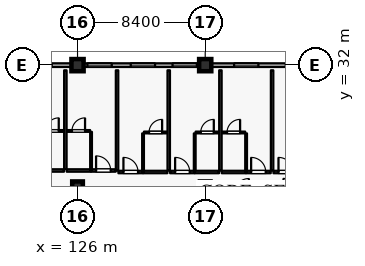
"""IFC4 building model, lengths in metres.
Left out: names, types, materials, properties, quantities, classifications, styles, units other than length and angle.
Written with IfcOpenShell. Run it as: python <this file> out.ifc"""

import sys

from ifc_helpers import new_model, si_unit, direction, frame, frame_2d, origin, origin_2d, place, context, subcontext, project, spatial, rectangle, extrude, element, fill, save


model = new_model("IFC4")
c1 = context("Model", 3, precision=1e-05, world=origin(), true_north=direction((0.0, 1.0)))
c2 = subcontext(c1, "Body", "Model", "MODEL_VIEW")
j1 = project(units=[si_unit("LENGTHUNIT", "METRE"), si_unit("PLANEANGLEUNIT", "RADIAN")], contexts=[c1])
p1 = place(None, origin())
s1 = spatial("IfcSite", under=j1, at=p1, CompositionType="ELEMENT")
p2 = place(p1, origin())
s2 = spatial("IfcBuilding", under=s1, at=p2, CompositionType="ELEMENT")
p3 = place(p2, frame((0.0, 0.0, 25.2)))
s3 = spatial("IfcBuildingStorey", under=s2, at=p3, CompositionType="ELEMENT", Elevation=25.2)
for number, where, z_axis, x_axis in (
    (1, (126.0, 32.0, 0.0), (0.0, 0.0, 1.0), (1.0, 0.0, 0.0)),
    (2, (134.4, 32.0, 0.0), (0.0, 0.0, 1.0), (1.0, 0.0, 0.0)),
):
    element("IfcColumn", number, at=place(p3, frame(where, z_axis=z_axis, x_axis=x_axis)), inside=s3, PredefinedType="COLUMN", context=c2, shape_type="SweptSolid", body=[
        extrude(rectangle(XDim=0.8, YDim=0.8, at=origin_2d()), origin(), (0.0, 0.0, 1.0), 3.6),
    ])
for number, where, z_axis, x_axis in (
    (3, (126.0, 24.0, 0.0), (0.0, 0.0, 1.0), (1.0, 0.0, 0.0)),
    (4, (134.4, 24.0, 0.0), (0.0, 0.0, 1.0), (1.0, 0.0, 0.0)),
):
    element("IfcColumn", number, at=place(p3, frame(where, z_axis=z_axis, x_axis=x_axis)), inside=s3, PredefinedType="COLUMN", context=c2, shape_type="SweptSolid", body=[
        extrude(rectangle(XDim=0.7, YDim=0.7, at=origin_2d()), origin(), (0.0, 0.0, 1.0), 3.6),
    ])
p4 = place(p3, frame((118.0, 32.0, 0.0), z_axis=(0.0, 0.0, 1.0), x_axis=(1.0, 0.0, 0.0)))
e5 = element("IfcWall", 5, at=p4, inside=s3, PredefinedType="SOLIDWALL", context=c2, shape_type="SweptSolid", body=[
    extrude(rectangle(XDim=7.6, YDim=0.24, at=frame_2d((3.8, 0.0))), origin(), (0.0, 0.0, 1.0), 2.93),
])
p5 = place(p4, frame((1.3, 0.0, 0.8)))
e6 = element("IfcOpeningElement", 6, at=p5, cuts=e5, PredefinedType="OPENING", context=c2, shape_type="SweptSolid", body=[
    extrude(rectangle(XDim=1.6, YDim=1.6, at=frame_2d((0.8, 0.8))), frame((0.0, 0.13, 0.0), z_axis=(0.0, -1.0, 0.0), x_axis=(1.0, 0.0, 0.0)), (0.0, 0.0, 1.0), 0.26),
])
p6 = place(p4, frame((4.7, 0.0, 0.8)))
e7 = element("IfcOpeningElement", 7, at=p6, cuts=e5, PredefinedType="OPENING", context=c2, shape_type="SweptSolid", body=[
    extrude(rectangle(XDim=1.6, YDim=1.6, at=frame_2d((0.8, 0.8))), frame((0.0, 0.13, 0.0), z_axis=(0.0, -1.0, 0.0), x_axis=(1.0, 0.0, 0.0)), (0.0, 0.0, 1.0), 0.26),
])
p7 = place(p3, frame((126.4, 32.0, 0.0), z_axis=(0.0, 0.0, 1.0), x_axis=(1.0, 0.0, 0.0)))
e8 = element("IfcWall", 8, at=p7, inside=s3, PredefinedType="SOLIDWALL", context=c2, shape_type="SweptSolid", body=[
    extrude(rectangle(XDim=7.6, YDim=0.24, at=frame_2d((3.8, 0.0))), origin(), (0.0, 0.0, 1.0), 2.93),
])
p8 = place(p7, frame((0.25, 0.0, 0.8)))
e9 = element("IfcOpeningElement", 9, at=p8, cuts=e8, PredefinedType="OPENING", context=c2, shape_type="SweptSolid", body=[
    extrude(rectangle(XDim=1.6, YDim=1.6, at=frame_2d((0.8, 0.8))), frame((0.0, 0.13, 0.0), z_axis=(0.0, -1.0, 0.0), x_axis=(1.0, 0.0, 0.0)), (0.0, 0.0, 1.0), 0.26),
])
p9 = place(p7, frame((3.1, 0.0, 0.8)))
e10 = element("IfcOpeningElement", 10, at=p9, cuts=e8, PredefinedType="OPENING", context=c2, shape_type="SweptSolid", body=[
    extrude(rectangle(XDim=1.6, YDim=1.6, at=frame_2d((0.8, 0.8))), frame((0.0, 0.13, 0.0), z_axis=(0.0, -1.0, 0.0), x_axis=(1.0, 0.0, 0.0)), (0.0, 0.0, 1.0), 0.26),
])
p10 = place(p7, frame((5.85, 0.0, 0.8)))
e11 = element("IfcOpeningElement", 11, at=p10, cuts=e8, PredefinedType="OPENING", context=c2, shape_type="SweptSolid", body=[
    extrude(rectangle(XDim=1.6, YDim=1.6, at=frame_2d((0.8, 0.8))), frame((0.0, 0.13, 0.0), z_axis=(0.0, -1.0, 0.0), x_axis=(1.0, 0.0, 0.0)), (0.0, 0.0, 1.0), 0.26),
])
p11 = place(p3, frame((134.8, 32.0, 0.0), z_axis=(0.0, 0.0, 1.0), x_axis=(1.0, 0.0, 0.0)))
e12 = element("IfcWall", 12, at=p11, inside=s3, PredefinedType="SOLIDWALL", context=c2, shape_type="SweptSolid", body=[
    extrude(rectangle(XDim=7.6, YDim=0.24, at=frame_2d((3.8, 0.0))), origin(), (0.0, 0.0, 1.0), 2.93),
])
p12 = place(p11, frame((1.5, 0.0, 0.8)))
e13 = element("IfcOpeningElement", 13, at=p12, cuts=e12, PredefinedType="OPENING", context=c2, shape_type="SweptSolid", body=[
    extrude(rectangle(XDim=1.6, YDim=1.6, at=frame_2d((0.8, 0.8))), frame((0.0, 0.13, 0.0), z_axis=(0.0, -1.0, 0.0), x_axis=(1.0, 0.0, 0.0)), (0.0, 0.0, 1.0), 0.26),
])
p13 = place(p11, frame((4.9, 0.0, 0.8)))
e14 = element("IfcOpeningElement", 14, at=p13, cuts=e12, PredefinedType="OPENING", context=c2, shape_type="SweptSolid", body=[
    extrude(rectangle(XDim=1.6, YDim=1.6, at=frame_2d((0.8, 0.8))), frame((0.0, 0.13, 0.0), z_axis=(0.0, -1.0, 0.0), x_axis=(1.0, 0.0, 0.0)), (0.0, 0.0, 1.0), 0.26),
])
p14 = place(p3, frame((123.52, 25.07, 0.0), z_axis=(0.0, 0.0, 1.0), x_axis=(1.0, 0.0, 0.0)))
e15 = element("IfcWall", 15, at=p14, inside=s3, PredefinedType="PARTITIONING", context=c2, shape_type="SweptSolid", body=[
    extrude(rectangle(XDim=1.59, YDim=0.16, at=frame_2d((0.795, 0.0))), origin(), (0.0, 0.0, 1.0), 3.335),
])
p15 = place(p3, frame((123.57, 27.67, 0.0), z_axis=(0.0, 0.0, 1.0), x_axis=(1.0, 0.0, 0.0)))
e16 = element("IfcWall", 16, at=p15, inside=s3, PredefinedType="PARTITIONING", context=c2, shape_type="SweptSolid", body=[
    extrude(rectangle(XDim=1.53, YDim=0.115, at=frame_2d((0.765, 0.0))), origin(), (0.0, 0.0, 1.0), 3.335),
])
p16 = place(p15, frame((0.335, 0.0, 0.0)))
e17 = element("IfcOpeningElement", 17, at=p16, cuts=e16, PredefinedType="OPENING", context=c2, shape_type="SweptSolid", body=[
    extrude(rectangle(XDim=0.86, YDim=2.12, at=frame_2d((0.43, 1.06))), frame((0.0, 0.067, 0.0), z_axis=(0.0, -1.0, 0.0), x_axis=(1.0, 0.0, 0.0)), (0.0, 0.0, 1.0), 0.135),
])
p17 = place(p3, frame((125.29, 25.07, 0.0), z_axis=(0.0, 0.0, 1.0), x_axis=(1.0, 0.0, 0.0)))
e18 = element("IfcWall", 18, at=p17, inside=s3, PredefinedType="PARTITIONING", context=c2, shape_type="SweptSolid", body=[
    extrude(rectangle(XDim=1.59, YDim=0.16, at=frame_2d((0.795, 0.0))), origin(), (0.0, 0.0, 1.0), 3.335),
])
p18 = place(p3, frame((126.89, 25.07, 0.0), z_axis=(0.0, 0.0, 1.0), x_axis=(1.0, 0.0, 0.0)))
e19 = element("IfcWall", 19, at=p18, inside=s3, PredefinedType="PARTITIONING", context=c2, shape_type="SweptSolid", body=[
    extrude(rectangle(XDim=1.62, YDim=0.16, at=frame_2d((0.81, 0.0))), origin(), (0.0, 0.0, 1.0), 3.335),
])
p19 = place(p18, frame((0.33, 0.0, 0.0)))
e20 = element("IfcOpeningElement", 20, at=p19, cuts=e19, PredefinedType="OPENING", context=c2, shape_type="SweptSolid", body=[
    extrude(rectangle(XDim=0.96, YDim=2.2, at=frame_2d((0.48, 1.1))), frame((0.0, 0.09, 0.0), z_axis=(0.0, -1.0, 0.0), x_axis=(1.0, 0.0, 0.0)), (0.0, 0.0, 1.0), 0.18),
])
p20 = place(p3, frame((126.89, 25.16, 0.0), z_axis=(0.0, 0.0, 1.0), x_axis=(0.0, 1.0, 0.0)))
e21 = element("IfcWall", 21, at=p20, inside=s3, PredefinedType="PARTITIONING", context=c2, shape_type="SweptSolid", body=[
    extrude(rectangle(XDim=2.45, YDim=0.115, at=frame_2d((1.225, 0.0))), origin(), (0.0, 0.0, 1.0), 3.335),
])
p21 = place(p3, frame((125.3, 27.67, 0.0), z_axis=(0.0, 0.0, 1.0), x_axis=(1.0, 0.0, 0.0)))
e22 = element("IfcWall", 22, at=p21, inside=s3, PredefinedType="PARTITIONING", context=c2, shape_type="SweptSolid", body=[
    extrude(rectangle(XDim=1.53, YDim=0.115, at=frame_2d((0.765, 0.0))), origin(), (0.0, 0.0, 1.0), 3.335),
])
p22 = place(p21, frame((0.335, 0.0, 0.0)))
e23 = element("IfcOpeningElement", 23, at=p22, cuts=e22, PredefinedType="OPENING", context=c2, shape_type="SweptSolid", body=[
    extrude(rectangle(XDim=0.86, YDim=2.12, at=frame_2d((0.43, 1.06))), frame((0.0, 0.067, 0.0), z_axis=(0.0, -1.0, 0.0), x_axis=(1.0, 0.0, 0.0)), (0.0, 0.0, 1.0), 0.135),
])
p23 = place(p3, frame((125.2, 25.16, 0.0), z_axis=(0.0, 0.0, 1.0), x_axis=(0.0, 1.0, 0.0)))
e24 = element("IfcWall", 24, at=p23, inside=s3, PredefinedType="PARTITIONING", context=c2, shape_type="SweptSolid", body=[
    extrude(rectangle(XDim=6.5, YDim=0.16, at=frame_2d((3.25, 0.0))), origin(), (0.0, 0.0, 1.0), 3.335),
])
p24 = place(p3, frame((128.69, 24.97, 0.0), z_axis=(0.0, 0.0, 1.0), x_axis=(1.0, 0.0, 0.0)))
e25 = element("IfcWall", 25, at=p24, inside=s3, PredefinedType="PARTITIONING", context=c2, shape_type="SweptSolid", body=[
    extrude(rectangle(XDim=1.62, YDim=0.16, at=frame_2d((0.81, 0.0))), origin(), (0.0, 0.0, 1.0), 3.335),
])
p25 = place(p24, frame((0.33, 0.0, 0.0)))
e26 = element("IfcOpeningElement", 26, at=p25, cuts=e25, PredefinedType="OPENING", context=c2, shape_type="SweptSolid", body=[
    extrude(rectangle(XDim=0.96, YDim=2.2, at=frame_2d((0.48, 1.1))), frame((0.0, 0.09, 0.0), z_axis=(0.0, -1.0, 0.0), x_axis=(1.0, 0.0, 0.0)), (0.0, 0.0, 1.0), 0.18),
])
p26 = place(p3, frame((130.32, 24.97, 0.0), z_axis=(0.0, 0.0, 1.0), x_axis=(1.0, 0.0, 0.0)))
e27 = element("IfcWall", 27, at=p26, inside=s3, PredefinedType="PARTITIONING", context=c2, shape_type="SweptSolid", body=[
    extrude(rectangle(XDim=1.59, YDim=0.16, at=frame_2d((0.795, 0.0))), origin(), (0.0, 0.0, 1.0), 3.335),
])
p27 = place(p3, frame((130.31, 25.06, 0.0), z_axis=(0.0, 0.0, 1.0), x_axis=(0.0, 1.0, 0.0)))
e28 = element("IfcWall", 28, at=p27, inside=s3, PredefinedType="PARTITIONING", context=c2, shape_type="SweptSolid", body=[
    extrude(rectangle(XDim=2.45, YDim=0.115, at=frame_2d((1.225, 0.0))), origin(), (0.0, 0.0, 1.0), 3.335),
])
p28 = place(p3, frame((130.37, 27.57, 0.0), z_axis=(0.0, 0.0, 1.0), x_axis=(1.0, 0.0, 0.0)))
e29 = element("IfcWall", 29, at=p28, inside=s3, PredefinedType="PARTITIONING", context=c2, shape_type="SweptSolid", body=[
    extrude(rectangle(XDim=1.53, YDim=0.115, at=frame_2d((0.765, 0.0))), origin(), (0.0, 0.0, 1.0), 3.335),
])
p29 = place(p28, frame((0.335, 0.0, 0.0)))
e30 = element("IfcOpeningElement", 30, at=p29, cuts=e29, PredefinedType="OPENING", context=c2, shape_type="SweptSolid", body=[
    extrude(rectangle(XDim=0.86, YDim=2.12, at=frame_2d((0.43, 1.06))), frame((0.0, 0.067, 0.0), z_axis=(0.0, -1.0, 0.0), x_axis=(1.0, 0.0, 0.0)), (0.0, 0.0, 1.0), 0.135),
])
p30 = place(p3, frame((128.6, 25.06, 0.0), z_axis=(0.0, 0.0, 1.0), x_axis=(0.0, 1.0, 0.0)))
e31 = element("IfcWall", 31, at=p30, inside=s3, PredefinedType="PARTITIONING", context=c2, shape_type="SweptSolid", body=[
    extrude(rectangle(XDim=6.6, YDim=0.16, at=frame_2d((3.3, 0.0))), origin(), (0.0, 0.0, 1.0), 3.335),
])
p31 = place(p3, frame((132.09, 24.97, 0.0), z_axis=(0.0, 0.0, 1.0), x_axis=(1.0, 0.0, 0.0)))
e32 = element("IfcWall", 32, at=p31, inside=s3, PredefinedType="PARTITIONING", context=c2, shape_type="SweptSolid", body=[
    extrude(rectangle(XDim=1.62, YDim=0.16, at=frame_2d((0.81, 0.0))), origin(), (0.0, 0.0, 1.0), 3.335),
])
p32 = place(p31, frame((0.33, 0.0, 0.0)))
e33 = element("IfcOpeningElement", 33, at=p32, cuts=e32, PredefinedType="OPENING", context=c2, shape_type="SweptSolid", body=[
    extrude(rectangle(XDim=0.96, YDim=2.2, at=frame_2d((0.48, 1.1))), frame((0.0, 0.09, 0.0), z_axis=(0.0, -1.0, 0.0), x_axis=(1.0, 0.0, 0.0)), (0.0, 0.0, 1.0), 0.18),
])
p33 = place(p3, frame((133.72, 24.97, 0.0), z_axis=(0.0, 0.0, 1.0), x_axis=(1.0, 0.0, 0.0)))
e34 = element("IfcWall", 34, at=p33, inside=s3, PredefinedType="PARTITIONING", context=c2, shape_type="SweptSolid", body=[
    extrude(rectangle(XDim=1.59, YDim=0.16, at=frame_2d((0.795, 0.0))), origin(), (0.0, 0.0, 1.0), 3.335),
])
p34 = place(p3, frame((133.71, 25.06, 0.0), z_axis=(0.0, 0.0, 1.0), x_axis=(0.0, 1.0, 0.0)))
e35 = element("IfcWall", 35, at=p34, inside=s3, PredefinedType="PARTITIONING", context=c2, shape_type="SweptSolid", body=[
    extrude(rectangle(XDim=2.45, YDim=0.115, at=frame_2d((1.225, 0.0))), origin(), (0.0, 0.0, 1.0), 3.335),
])
p35 = place(p3, frame((133.77, 27.57, 0.0), z_axis=(0.0, 0.0, 1.0), x_axis=(1.0, 0.0, 0.0)))
e36 = element("IfcWall", 36, at=p35, inside=s3, PredefinedType="PARTITIONING", context=c2, shape_type="SweptSolid", body=[
    extrude(rectangle(XDim=1.53, YDim=0.115, at=frame_2d((0.765, 0.0))), origin(), (0.0, 0.0, 1.0), 3.335),
])
p36 = place(p35, frame((0.335, 0.0, 0.0)))
e37 = element("IfcOpeningElement", 37, at=p36, cuts=e36, PredefinedType="OPENING", context=c2, shape_type="SweptSolid", body=[
    extrude(rectangle(XDim=0.86, YDim=2.12, at=frame_2d((0.43, 1.06))), frame((0.0, 0.067, 0.0), z_axis=(0.0, -1.0, 0.0), x_axis=(1.0, 0.0, 0.0)), (0.0, 0.0, 1.0), 0.135),
])
p37 = place(p3, frame((132.0, 25.06, 0.0), z_axis=(0.0, 0.0, 1.0), x_axis=(0.0, 1.0, 0.0)))
e38 = element("IfcWall", 38, at=p37, inside=s3, PredefinedType="PARTITIONING", context=c2, shape_type="SweptSolid", body=[
    extrude(rectangle(XDim=6.6, YDim=0.16, at=frame_2d((3.3, 0.0))), origin(), (0.0, 0.0, 1.0), 3.335),
])
p38 = place(p3, frame((135.49, 24.97, 0.0), z_axis=(0.0, 0.0, 1.0), x_axis=(1.0, 0.0, 0.0)))
e39 = element("IfcWall", 39, at=p38, inside=s3, PredefinedType="PARTITIONING", context=c2, shape_type="SweptSolid", body=[
    extrude(rectangle(XDim=1.59, YDim=0.16, at=frame_2d((0.795, 0.0))), origin(), (0.0, 0.0, 1.0), 3.335),
])
p39 = place(p3, frame((137.09, 24.97, 0.0), z_axis=(0.0, 0.0, 1.0), x_axis=(1.0, 0.0, 0.0)))
e40 = element("IfcWall", 40, at=p39, inside=s3, PredefinedType="PARTITIONING", context=c2, shape_type="SweptSolid", body=[
    extrude(rectangle(XDim=1.62, YDim=0.16, at=frame_2d((0.81, 0.0))), origin(), (0.0, 0.0, 1.0), 3.335),
])
p40 = place(p39, frame((0.33, 0.0, 0.0)))
e41 = element("IfcOpeningElement", 41, at=p40, cuts=e40, PredefinedType="OPENING", context=c2, shape_type="SweptSolid", body=[
    extrude(rectangle(XDim=0.96, YDim=2.2, at=frame_2d((0.48, 1.1))), frame((0.0, 0.09, 0.0), z_axis=(0.0, -1.0, 0.0), x_axis=(1.0, 0.0, 0.0)), (0.0, 0.0, 1.0), 0.18),
])
p41 = place(p3, frame((137.09, 25.06, 0.0), z_axis=(0.0, 0.0, 1.0), x_axis=(0.0, 1.0, 0.0)))
e42 = element("IfcWall", 42, at=p41, inside=s3, PredefinedType="PARTITIONING", context=c2, shape_type="SweptSolid", body=[
    extrude(rectangle(XDim=2.45, YDim=0.115, at=frame_2d((1.225, 0.0))), origin(), (0.0, 0.0, 1.0), 3.335),
])
p42 = place(p3, frame((135.5, 27.57, 0.0), z_axis=(0.0, 0.0, 1.0), x_axis=(1.0, 0.0, 0.0)))
e43 = element("IfcWall", 43, at=p42, inside=s3, PredefinedType="PARTITIONING", context=c2, shape_type="SweptSolid", body=[
    extrude(rectangle(XDim=1.53, YDim=0.115, at=frame_2d((0.765, 0.0))), origin(), (0.0, 0.0, 1.0), 3.335),
])
p43 = place(p42, frame((0.335, 0.0, 0.0)))
e44 = element("IfcOpeningElement", 44, at=p43, cuts=e43, PredefinedType="OPENING", context=c2, shape_type="SweptSolid", body=[
    extrude(rectangle(XDim=0.86, YDim=2.12, at=frame_2d((0.43, 1.06))), frame((0.0, 0.067, 0.0), z_axis=(0.0, -1.0, 0.0), x_axis=(1.0, 0.0, 0.0)), (0.0, 0.0, 1.0), 0.135),
])
p44 = place(p3, frame((135.4, 25.06, 0.0), z_axis=(0.0, 0.0, 1.0), x_axis=(0.0, 1.0, 0.0)))
e45 = element("IfcWall", 45, at=p44, inside=s3, PredefinedType="PARTITIONING", context=c2, shape_type="SweptSolid", body=[
    extrude(rectangle(XDim=6.6, YDim=0.16, at=frame_2d((3.3, 0.0))), origin(), (0.0, 0.0, 1.0), 3.335),
])
p45 = place(p3, frame((138.89, 24.97, 0.0), z_axis=(0.0, 0.0, 1.0), x_axis=(1.0, 0.0, 0.0)))
e46 = element("IfcWall", 46, at=p45, inside=s3, PredefinedType="PARTITIONING", context=c2, shape_type="SweptSolid", body=[
    extrude(rectangle(XDim=1.62, YDim=0.16, at=frame_2d((0.81, 0.0))), origin(), (0.0, 0.0, 1.0), 3.335),
])
p46 = place(p45, frame((0.33, 0.0, 0.0)))
e47 = element("IfcOpeningElement", 47, at=p46, cuts=e46, PredefinedType="OPENING", context=c2, shape_type="SweptSolid", body=[
    extrude(rectangle(XDim=0.96, YDim=2.2, at=frame_2d((0.48, 1.1))), frame((0.0, 0.09, 0.0), z_axis=(0.0, -1.0, 0.0), x_axis=(1.0, 0.0, 0.0)), (0.0, 0.0, 1.0), 0.18),
])
p47 = place(p3, frame((138.8, 25.06, 0.0), z_axis=(0.0, 0.0, 1.0), x_axis=(0.0, 1.0, 0.0)))
e48 = element("IfcWall", 48, at=p47, inside=s3, PredefinedType="PARTITIONING", context=c2, shape_type="SweptSolid", body=[
    extrude(rectangle(XDim=6.6, YDim=0.16, at=frame_2d((3.3, 0.0))), origin(), (0.0, 0.0, 1.0), 3.335),
])
p48 = place(p8, origin())
e49 = element("IfcWindow", 49, at=p48, inside=s3, PartitioningType="SINGLE_PANEL", PredefinedType="WINDOW", context=c2, shape_type="SweptSolid", body=[
    extrude(rectangle(XDim=1.6, YDim=1.6, at=frame_2d((0.8, 0.8))), frame((0.0, 0.03, 0.0), z_axis=(0.0, -1.0, 0.0), x_axis=(1.0, 0.0, 0.0)), (0.0, 0.0, 1.0), 0.06),
])
fill(e9, e49)
p49 = place(p9, origin())
e50 = element("IfcWindow", 50, at=p49, inside=s3, PartitioningType="SINGLE_PANEL", PredefinedType="WINDOW", context=c2, shape_type="SweptSolid", body=[
    extrude(rectangle(XDim=1.6, YDim=1.6, at=frame_2d((0.8, 0.8))), frame((0.0, 0.03, 0.0), z_axis=(0.0, -1.0, 0.0), x_axis=(1.0, 0.0, 0.0)), (0.0, 0.0, 1.0), 0.06),
])
fill(e10, e50)
p50 = place(p10, origin())
e51 = element("IfcWindow", 51, at=p50, inside=s3, PartitioningType="SINGLE_PANEL", PredefinedType="WINDOW", context=c2, shape_type="SweptSolid", body=[
    extrude(rectangle(XDim=1.6, YDim=1.6, at=frame_2d((0.8, 0.8))), frame((0.0, 0.03, 0.0), z_axis=(0.0, -1.0, 0.0), x_axis=(1.0, 0.0, 0.0)), (0.0, 0.0, 1.0), 0.06),
])
fill(e11, e51)
p51 = place(p12, origin())
e52 = element("IfcWindow", 52, at=p51, inside=s3, PartitioningType="SINGLE_PANEL", PredefinedType="WINDOW", context=c2, shape_type="SweptSolid", body=[
    extrude(rectangle(XDim=1.6, YDim=1.6, at=frame_2d((0.8, 0.8))), frame((0.0, 0.03, 0.0), z_axis=(0.0, -1.0, 0.0), x_axis=(1.0, 0.0, 0.0)), (0.0, 0.0, 1.0), 0.06),
])
fill(e13, e52)
p52 = place(p16, origin())
e53 = element("IfcDoor", 53, at=p52, inside=s3, OperationType="SINGLE_SWING_RIGHT", PredefinedType="DOOR", context=c2, shape_type="SweptSolid", body=[
    extrude(rectangle(XDim=0.86, YDim=2.12, at=frame_2d((0.43, 1.06))), frame((0.0, 0.025, 0.0), z_axis=(0.0, -1.0, 0.0), x_axis=(1.0, 0.0, 0.0)), (0.0, 0.0, 1.0), 0.05),
])
fill(e17, e53)
p53 = place(p19, origin())
e54 = element("IfcDoor", 54, at=p53, inside=s3, OperationType="SINGLE_SWING_LEFT", PredefinedType="DOOR", context=c2, shape_type="SweptSolid", body=[
    extrude(rectangle(XDim=0.96, YDim=2.2, at=frame_2d((0.48, 1.1))), frame((0.0, 0.025, 0.0), z_axis=(0.0, -1.0, 0.0), x_axis=(1.0, 0.0, 0.0)), (0.0, 0.0, 1.0), 0.05),
])
fill(e20, e54)
p54 = place(p22, origin())
e55 = element("IfcDoor", 55, at=p54, inside=s3, OperationType="SINGLE_SWING_RIGHT", PredefinedType="DOOR", context=c2, shape_type="SweptSolid", body=[
    extrude(rectangle(XDim=0.86, YDim=2.12, at=frame_2d((0.43, 1.06))), frame((0.0, 0.025, 0.0), z_axis=(0.0, -1.0, 0.0), x_axis=(1.0, 0.0, 0.0)), (0.0, 0.0, 1.0), 0.05),
])
fill(e23, e55)
p55 = place(p25, origin())
e56 = element("IfcDoor", 56, at=p55, inside=s3, OperationType="SINGLE_SWING_LEFT", PredefinedType="DOOR", context=c2, shape_type="SweptSolid", body=[
    extrude(rectangle(XDim=0.96, YDim=2.2, at=frame_2d((0.48, 1.1))), frame((0.0, 0.025, 0.0), z_axis=(0.0, -1.0, 0.0), x_axis=(1.0, 0.0, 0.0)), (0.0, 0.0, 1.0), 0.05),
])
fill(e26, e56)
p56 = place(p29, origin())
e57 = element("IfcDoor", 57, at=p56, inside=s3, OperationType="SINGLE_SWING_RIGHT", PredefinedType="DOOR", context=c2, shape_type="SweptSolid", body=[
    extrude(rectangle(XDim=0.86, YDim=2.12, at=frame_2d((0.43, 1.06))), frame((0.0, 0.025, 0.0), z_axis=(0.0, -1.0, 0.0), x_axis=(1.0, 0.0, 0.0)), (0.0, 0.0, 1.0), 0.05),
])
fill(e30, e57)
p57 = place(p32, origin())
e58 = element("IfcDoor", 58, at=p57, inside=s3, OperationType="SINGLE_SWING_LEFT", PredefinedType="DOOR", context=c2, shape_type="SweptSolid", body=[
    extrude(rectangle(XDim=0.96, YDim=2.2, at=frame_2d((0.48, 1.1))), frame((0.0, 0.025, 0.0), z_axis=(0.0, -1.0, 0.0), x_axis=(1.0, 0.0, 0.0)), (0.0, 0.0, 1.0), 0.05),
])
fill(e33, e58)
p58 = place(p36, origin())
e59 = element("IfcDoor", 59, at=p58, inside=s3, OperationType="SINGLE_SWING_RIGHT", PredefinedType="DOOR", context=c2, shape_type="SweptSolid", body=[
    extrude(rectangle(XDim=0.86, YDim=2.12, at=frame_2d((0.43, 1.06))), frame((0.0, 0.025, 0.0), z_axis=(0.0, -1.0, 0.0), x_axis=(1.0, 0.0, 0.0)), (0.0, 0.0, 1.0), 0.05),
])
fill(e37, e59)
p59 = place(p40, origin())
e60 = element("IfcDoor", 60, at=p59, inside=s3, OperationType="SINGLE_SWING_LEFT", PredefinedType="DOOR", context=c2, shape_type="SweptSolid", body=[
    extrude(rectangle(XDim=0.96, YDim=2.2, at=frame_2d((0.48, 1.1))), frame((0.0, 0.025, 0.0), z_axis=(0.0, -1.0, 0.0), x_axis=(1.0, 0.0, 0.0)), (0.0, 0.0, 1.0), 0.05),
])
fill(e41, e60)
p60 = place(p43, origin())
e61 = element("IfcDoor", 61, at=p60, inside=s3, OperationType="SINGLE_SWING_RIGHT", PredefinedType="DOOR", context=c2, shape_type="SweptSolid", body=[
    extrude(rectangle(XDim=0.86, YDim=2.12, at=frame_2d((0.43, 1.06))), frame((0.0, 0.025, 0.0), z_axis=(0.0, -1.0, 0.0), x_axis=(1.0, 0.0, 0.0)), (0.0, 0.0, 1.0), 0.05),
])
fill(e44, e61)
p61 = place(p46, origin())
e62 = element("IfcDoor", 62, at=p61, inside=s3, OperationType="SINGLE_SWING_LEFT", PredefinedType="DOOR", context=c2, shape_type="SweptSolid", body=[
    extrude(rectangle(XDim=0.96, YDim=2.2, at=frame_2d((0.48, 1.1))), frame((0.0, 0.025, 0.0), z_axis=(0.0, -1.0, 0.0), x_axis=(1.0, 0.0, 0.0)), (0.0, 0.0, 1.0), 0.05),
])
fill(e47, e62)
save(model, sys.argv[1])
